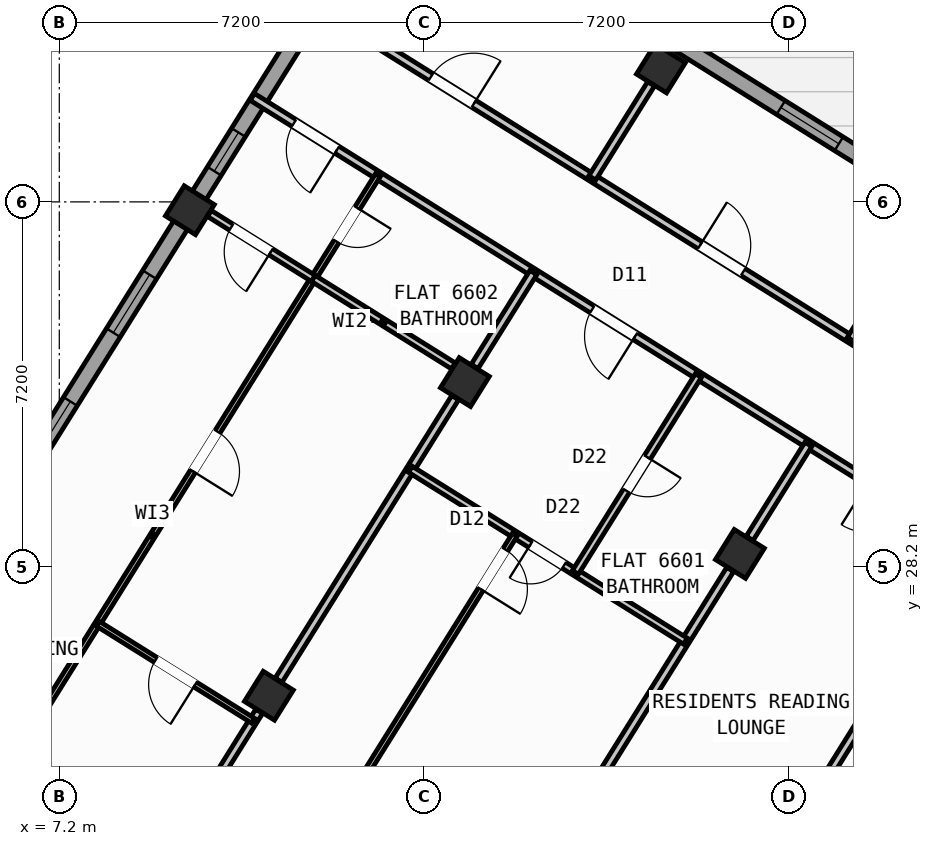
"""IFC4 building model, lengths in metres.
Left out: names, types, materials, properties, quantities, classifications, styles, units other than length and angle.
Written with IfcOpenShell. Run it as: python <this file> out.ifc"""

import sys

from ifc_helpers import new_model, si_unit, direction, frame, frame_2d, origin, origin_2d, place, context, subcontext, project, spatial, rectangle, hollow_rectangle, extrude, source, transform, mapped, element, fill, save


model = new_model("IFC4")
c1 = context("Model", 3, precision=1e-05, world=origin(), true_north=direction((0.0, 1.0)))
c2 = subcontext(c1, "Body", "Model", "MODEL_VIEW")
j1 = project(units=[si_unit("LENGTHUNIT", "METRE"), si_unit("PLANEANGLEUNIT", "RADIAN")], contexts=[c1])
p1 = place(None, origin())
s1 = spatial("IfcSite", under=j1, at=p1, CompositionType="ELEMENT")
p2 = place(p1, origin())
s2 = spatial("IfcBuilding", under=s1, at=p2, CompositionType="ELEMENT")
p3 = place(p2, frame((0.0, 0.0, 262.8)))
s3 = spatial("IfcBuildingStorey", under=s2, at=p3, CompositionType="ELEMENT", Elevation=262.8)
p4 = place(p3, frame((26.007, 24.976, 0.0), z_axis=(0.0, 0.0, 1.0), x_axis=(-0.529931155655, -0.848040665456, 0.0)))
e1 = element("IfcWall", 1, at=p4, inside=s3, PredefinedType="SHEAR", context=c2, shape_type="SweptSolid", body=[
    extrude(rectangle(XDim=6.475, YDim=0.45, at=frame_2d((3.238, 0.0))), origin(), (0.0, 0.0, 1.0), 3.35),
])
m1 = source(origin(), c2, "Body", "SweptSolid", [
    extrude(hollow_rectangle(XDim=0.7, YDim=0.7, WallThickness=0.028, at=origin_2d()), origin(), (0.0, 0.0, 1.0), 3.6),
])
for number, where, z_axis, x_axis in (
    (2, (20.632, 28.452, 0.0), (0.0, 0.0, 1.0), (-0.848, 0.53, 0.0)),
    (3, (19.073, 38.034, 0.0), (0.0, 0.0, 1.0), (-0.848, 0.53, 0.0)),
    (4, (15.205, 31.844, 0.0), (0.0, 0.0, 1.0), (-0.848, 0.53, 0.0)),
    (5, (11.336, 25.653, 0.0), (0.0, 0.0, 1.0), (-0.848, 0.53, 0.0)),
    (6, (9.777, 35.235, 0.0), (0.0, 0.0, 1.0), (-0.848, 0.53, 0.0)),
):
    element("IfcColumn", number, at=place(p3, frame(where, z_axis=z_axis, x_axis=x_axis)), inside=s3, PredefinedType="COLUMN", context=c2, shape_type="MappedRepresentation", body=[
        mapped(m1, transform((0.0, 0.0, 0.0), scale=1.0)),
    ])
p5 = place(p3, frame((2.415, 23.452, 0.0), z_axis=(0.0, 0.0, 1.0), x_axis=(0.52991049553, 0.848053575387, 0.0)))
e7 = element("IfcWall", 7, at=p5, inside=s3, PredefinedType="STANDARD", context=c2, shape_type="SweptSolid", body=[
    extrude(rectangle(XDim=21.587, YDim=0.32, at=frame_2d((10.794, 0.0))), origin(), (0.0, 0.0, 1.0), 2.875),
])
p6 = place(p5, frame((2.606, 0.0, 0.9)))
e8 = element("IfcOpeningElement", 8, at=p6, cuts=e7, PredefinedType="OPENING", context=c2, shape_type="SweptSolid", body=[
    extrude(rectangle(XDim=1.65, YDim=1.45, at=frame_2d((0.825, 0.725))), frame((0.0, 0.17, 0.0), z_axis=(0.0, -1.0, 0.0), x_axis=(1.0, 0.0, 0.0)), (0.0, 0.0, 1.0), 0.34),
])
p7 = place(p5, frame((8.094, 0.0, 0.9)))
e9 = element("IfcOpeningElement", 9, at=p7, cuts=e7, PredefinedType="OPENING", context=c2, shape_type="SweptSolid", body=[
    extrude(rectangle(XDim=1.35, YDim=1.45, at=frame_2d((0.675, 0.725))), frame((0.0, 0.17, 0.0), z_axis=(0.0, -1.0, 0.0), x_axis=(1.0, 0.0, 0.0)), (0.0, 0.0, 1.0), 0.34),
])
p8 = place(p5, frame((11.044, 0.0, 0.9)))
e10 = element("IfcOpeningElement", 10, at=p8, cuts=e7, PredefinedType="OPENING", context=c2, shape_type="SweptSolid", body=[
    extrude(rectangle(XDim=1.35, YDim=1.45, at=frame_2d((0.675, 0.725))), frame((0.0, 0.17, 0.0), z_axis=(0.0, -1.0, 0.0), x_axis=(1.0, 0.0, 0.0)), (0.0, 0.0, 1.0), 0.34),
])
p9 = place(p5, frame((14.804, 0.0, 1.0)))
e11 = element("IfcOpeningElement", 11, at=p9, cuts=e7, PredefinedType="OPENING", context=c2, shape_type="SweptSolid", body=[
    extrude(rectangle(XDim=0.9, YDim=1.25, at=frame_2d((0.45, 0.625))), frame((0.0, 0.17, 0.0), z_axis=(0.0, -1.0, 0.0), x_axis=(1.0, 0.0, 0.0)), (0.0, 0.0, 1.0), 0.34),
])
p10 = place(p5, frame((19.384, 0.0, 1.0)))
e12 = element("IfcOpeningElement", 12, at=p10, cuts=e7, PredefinedType="OPENING", context=c2, shape_type="SweptSolid", body=[
    extrude(rectangle(XDim=0.9, YDim=1.25, at=frame_2d((0.45, 0.625))), frame((0.0, 0.17, 0.0), z_axis=(0.0, -1.0, 0.0), x_axis=(1.0, 0.0, 0.0)), (0.0, 0.0, 1.0), 0.34),
])
p11 = place(p3, frame((14.138, 41.825, 0.0), z_axis=(0.0, 0.0, 1.0), x_axis=(0.848046498049, -0.529921821731, 0.0)))
e13 = element("IfcWall", 13, at=p11, inside=s3, PredefinedType="STANDARD", context=c2, shape_type="SweptSolid", body=[
    extrude(rectangle(XDim=31.588, YDim=0.32, at=frame_2d((15.794, 0.0))), origin(), (0.0, 0.0, 1.0), 3.35),
])
p12 = place(p11, frame((3.568, 0.0, 0.0)))
e14 = element("IfcOpeningElement", 14, at=p12, cuts=e13, PredefinedType="OPENING", context=c2, shape_type="SweptSolid", body=[
    extrude(rectangle(XDim=1.05, YDim=2.15, at=frame_2d((0.525, 1.075))), frame((0.0, 0.17, 0.0), z_axis=(0.0, -1.0, 0.0), x_axis=(1.0, 0.0, 0.0)), (0.0, 0.0, 1.0), 0.34),
])
p13 = place(p11, frame((1.046, 0.0, 0.9)))
e15 = element("IfcOpeningElement", 15, at=p13, cuts=e13, PredefinedType="OPENING", context=c2, shape_type="SweptSolid", body=[
    extrude(rectangle(XDim=1.65, YDim=1.45, at=frame_2d((0.825, 0.725))), frame((0.0, 0.17, 0.0), z_axis=(0.0, -1.0, 0.0), x_axis=(1.0, 0.0, 0.0)), (0.0, 0.0, 1.0), 0.34),
])
p14 = place(p11, frame((8.61, 0.0, 0.9)))
e16 = element("IfcOpeningElement", 16, at=p14, cuts=e13, PredefinedType="OPENING", context=c2, shape_type="SweptSolid", body=[
    extrude(rectangle(XDim=1.35, YDim=1.45, at=frame_2d((0.675, 0.725))), frame((0.0, 0.17, 0.0), z_axis=(0.0, -1.0, 0.0), x_axis=(1.0, 0.0, 0.0)), (0.0, 0.0, 1.0), 0.34),
])
p15 = place(p11, frame((13.599, 0.0, 0.95)))
e17 = element("IfcOpeningElement", 17, at=p15, cuts=e13, PredefinedType="OPENING", context=c2, shape_type="SweptSolid", body=[
    extrude(rectangle(XDim=1.95, YDim=1.35, at=frame_2d((0.975, 0.675))), frame((0.0, 0.17, 0.0), z_axis=(0.0, -1.0, 0.0), x_axis=(1.0, 0.0, 0.0)), (0.0, 0.0, 1.0), 0.34),
])
p16 = place(p11, frame((17.154, 0.0, 1.0)))
e18 = element("IfcOpeningElement", 18, at=p16, cuts=e13, PredefinedType="OPENING", context=c2, shape_type="SweptSolid", body=[
    extrude(rectangle(XDim=0.9, YDim=1.25, at=frame_2d((0.45, 0.625))), frame((0.0, 0.17, 0.0), z_axis=(0.0, -1.0, 0.0), x_axis=(1.0, 0.0, 0.0)), (0.0, 0.0, 1.0), 0.34),
])
p17 = place(p11, frame((21.719, 0.0, 0.9)))
e19 = element("IfcOpeningElement", 19, at=p17, cuts=e13, PredefinedType="OPENING", context=c2, shape_type="SweptSolid", body=[
    extrude(rectangle(XDim=1.65, YDim=1.45, at=frame_2d((0.825, 0.725))), frame((0.0, 0.17, 0.0), z_axis=(0.0, -1.0, 0.0), x_axis=(1.0, 0.0, 0.0)), (0.0, 0.0, 1.0), 0.34),
])
p18 = place(p11, frame((27.419, 0.0, 0.9)))
e20 = element("IfcOpeningElement", 20, at=p18, cuts=e13, PredefinedType="OPENING", context=c2, shape_type="SweptSolid", body=[
    extrude(rectangle(XDim=1.65, YDim=1.45, at=frame_2d((0.825, 0.725))), frame((0.0, 0.17, 0.0), z_axis=(0.0, -1.0, 0.0), x_axis=(1.0, 0.0, 0.0)), (0.0, 0.0, 1.0), 0.34),
])
p19 = place(p3, frame((25.198, 28.606, 0.0), z_axis=(0.0, 0.0, 1.0), x_axis=(-0.529921796515, -0.848046513806, 0.0)))
e21 = element("IfcWall", 21, at=p19, inside=s3, PredefinedType="PARTITIONING", context=c2, shape_type="SweptSolid", body=[
    extrude(rectangle(XDim=16.5, YDim=0.16, at=frame_2d((8.25, 0.0))), origin(), (0.0, 0.0, 1.0), 3.34),
])
p20 = place(p3, frame((26.363, 30.472, 0.0), z_axis=(0.0, 0.0, 1.0), x_axis=(-0.848052408131, 0.529912363569, 0.0)))
e22 = element("IfcWall", 22, at=p20, inside=s3, PredefinedType="PARTITIONING", context=c2, shape_type="SweptSolid", body=[
    extrude(rectangle(XDim=16.73, YDim=0.16, at=frame_2d((8.365, 0.0))), origin(), (0.0, 0.0, 1.0), 3.34),
])
p21 = place(p20, frame((1.588, 0.0, 0.0)))
e23 = element("IfcOpeningElement", 23, at=p21, cuts=e22, PredefinedType="OPENING", context=c2, shape_type="SweptSolid", body=[
    extrude(rectangle(XDim=1.0, YDim=2.1, at=frame_2d((0.5, 1.05))), frame((0.0, 0.09, 0.0), z_axis=(0.0, -1.0, 0.0), x_axis=(1.0, 0.0, 0.0)), (0.0, 0.0, 1.0), 0.18),
])
p22 = place(p20, frame((6.685, 0.0, 0.0)))
e24 = element("IfcOpeningElement", 24, at=p22, cuts=e22, PredefinedType="OPENING", context=c2, shape_type="SweptSolid", body=[
    extrude(rectangle(XDim=1.0, YDim=2.1, at=frame_2d((0.5, 1.05))), frame((0.0, 0.09, 0.0), z_axis=(0.0, -1.0, 0.0), x_axis=(1.0, 0.0, 0.0)), (0.0, 0.0, 1.0), 0.18),
])
p23 = place(p20, frame((12.951, 0.0, 0.0)))
e25 = element("IfcOpeningElement", 25, at=p23, cuts=e22, PredefinedType="OPENING", context=c2, shape_type="SweptSolid", body=[
    extrude(rectangle(XDim=1.0, YDim=2.1, at=frame_2d((0.5, 1.05))), frame((0.0, 0.09, 0.0), z_axis=(0.0, -1.0, 0.0), x_axis=(1.0, 0.0, 0.0)), (0.0, 0.0, 1.0), 0.18),
])
p24 = place(p3, frame((25.198, 28.606, 0.0), z_axis=(0.0, 0.0, 1.0), x_axis=(-0.848052408131, 0.529912363569, 0.0)))
e26 = element("IfcWall", 26, at=p24, inside=s3, PredefinedType="PARTITIONING", context=c2, shape_type="SweptSolid", body=[
    extrude(rectangle(XDim=16.73, YDim=0.16, at=frame_2d((8.365, 0.0))), origin(), (0.0, 0.0, 1.0), 3.34),
])
p25 = place(p24, frame((1.395, 0.0, 0.0)))
e27 = element("IfcOpeningElement", 27, at=p25, cuts=e26, PredefinedType="OPENING", context=c2, shape_type="SweptSolid", body=[
    extrude(rectangle(XDim=1.0, YDim=2.1, at=frame_2d((0.5, 1.05))), frame((0.0, 0.09, 0.0), z_axis=(0.0, -1.0, 0.0), x_axis=(1.0, 0.0, 0.0)), (0.0, 0.0, 1.0), 0.18),
])
p26 = place(p24, frame((7.82, 0.0, 0.0)))
e28 = element("IfcOpeningElement", 28, at=p26, cuts=e26, PredefinedType="OPENING", context=c2, shape_type="SweptSolid", body=[
    extrude(rectangle(XDim=1.0, YDim=2.1, at=frame_2d((0.5, 1.05))), frame((0.0, 0.09, 0.0), z_axis=(0.0, -1.0, 0.0), x_axis=(1.0, 0.0, 0.0)), (0.0, 0.0, 1.0), 0.18),
])
p27 = place(p24, frame((14.76, 0.0, 0.0)))
e29 = element("IfcOpeningElement", 29, at=p27, cuts=e26, PredefinedType="OPENING", context=c2, shape_type="SweptSolid", body=[
    extrude(rectangle(XDim=1.0, YDim=2.1, at=frame_2d((0.5, 1.05))), frame((0.0, 0.09, 0.0), z_axis=(0.0, -1.0, 0.0), x_axis=(1.0, 0.0, 0.0)), (0.0, 0.0, 1.0), 0.18),
])
p28 = place(p3, frame((21.983, 30.615, 0.0), z_axis=(0.0, 0.0, 1.0), x_axis=(-0.5299186965, -0.848048450915, 0.0)))
e30 = element("IfcWall", 30, at=p28, inside=s3, PredefinedType="PARTITIONING", context=c2, shape_type="SweptSolid", body=[
    extrude(rectangle(XDim=2.188, YDim=0.16, at=frame_2d((1.094, 0.0))), origin(), (0.0, 0.0, 1.0), 2.875),
])
p29 = place(p3, frame((20.44, 28.145, 0.0), z_axis=(0.0, 0.0, 1.0), x_axis=(-0.529938869374, -0.84803584519, 0.0)))
e31 = element("IfcWall", 31, at=p29, inside=s3, PredefinedType="PARTITIONING", context=c2, shape_type="SweptSolid", body=[
    extrude(rectangle(XDim=6.576, YDim=0.16, at=frame_2d((3.288, 0.0))), origin(), (0.0, 0.0, 1.0), 2.875),
])
p30 = place(p3, frame((16.556, 34.006, 0.0), z_axis=(0.0, 0.0, 1.0), x_axis=(-0.529998940003, -0.847998304005, 0.0)))
e32 = element("IfcWall", 32, at=p30, inside=s3, PredefinedType="PARTITIONING", context=c2, shape_type="SweptSolid", body=[
    extrude(rectangle(XDim=2.188, YDim=0.16, at=frame_2d((1.094, 0.0))), origin(), (0.0, 0.0, 1.0), 2.875),
])
p31 = place(p3, frame((15.013, 31.537, 0.0), z_axis=(0.0, 0.0, 1.0), x_axis=(-0.529922185033, -0.848046271031, 0.0)))
e33 = element("IfcWall", 33, at=p31, inside=s3, PredefinedType="PARTITIONING", context=c2, shape_type="SweptSolid", body=[
    extrude(rectangle(XDim=6.576, YDim=0.16, at=frame_2d((3.288, 0.0))), origin(), (0.0, 0.0, 1.0), 2.875),
])
p32 = place(p3, frame((11.144, 25.346, 0.0), z_axis=(0.0, 0.0, 1.0), x_axis=(-0.529904903214, -0.848057069748, 0.0)))
e34 = element("IfcWall", 34, at=p32, inside=s3, PredefinedType="PARTITIONING", context=c2, shape_type="SweptSolid", body=[
    extrude(rectangle(XDim=5.601, YDim=0.16, at=frame_2d((2.801, 0.0))), origin(), (0.0, 0.0, 1.0), 2.875),
])
p33 = place(p3, frame((19.556, 26.73, 0.0), z_axis=(0.0, 0.0, 1.0), x_axis=(-0.848049732085, 0.529916646191, 0.0)))
e35 = element("IfcWall", 35, at=p33, inside=s3, PredefinedType="PLUMBINGWALL", context=c2, shape_type="SweptSolid", body=[
    extrude(rectangle(XDim=6.4, YDim=0.14, at=frame_2d((3.2, 0.0))), origin(), (0.0, 0.0, 1.0), 3.34),
])
p34 = place(p33, frame((2.824, 0.0, 0.0)))
e36 = element("IfcOpeningElement", 36, at=p34, cuts=e35, PredefinedType="OPENING", context=c2, shape_type="SweptSolid", body=[
    extrude(rectangle(XDim=0.78, YDim=2.05, at=frame_2d((0.39, 1.025))), frame((0.0, 0.08, 0.0), z_axis=(0.0, -1.0, 0.0), x_axis=(1.0, 0.0, 0.0)), (0.0, 0.0, 1.0), 0.16),
])
p35 = place(p3, frame((19.812, 31.971, 0.0), z_axis=(0.0, 0.0, 1.0), x_axis=(-0.529917480809, -0.848049210561, 0.0)))
e37 = element("IfcWall", 37, at=p35, inside=s3, PredefinedType="PLUMBINGWALL", context=c2, shape_type="SweptSolid", body=[
    extrude(rectangle(XDim=4.58, YDim=0.14, at=frame_2d((2.29, 0.0))), origin(), (0.0, 0.0, 1.0), 3.34),
])
p36 = place(p35, frame((1.9, 0.0, 0.0)))
e38 = element("IfcOpeningElement", 38, at=p36, cuts=e37, PredefinedType="OPENING", context=c2, shape_type="SweptSolid", body=[
    extrude(rectangle(XDim=0.78, YDim=2.05, at=frame_2d((0.39, 1.025))), frame((0.0, 0.08, 0.0), z_axis=(0.0, -1.0, 0.0), x_axis=(1.0, 0.0, 0.0)), (0.0, 0.0, 1.0), 0.16),
])
p37 = place(p3, frame((16.191, 28.833, 0.0), z_axis=(0.0, 0.0, 1.0), x_axis=(-0.529921526101, -0.84804668278, 0.0)))
e39 = element("IfcWall", 39, at=p37, inside=s3, PredefinedType="PARTITIONING", context=c2, shape_type="SweptSolid", body=[
    extrude(rectangle(XDim=12.19, YDim=0.11, at=frame_2d((6.095, 0.0))), origin(), (0.0, 0.0, 1.0), 3.34),
])
p38 = place(p37, frame((0.35, 0.0, 0.0)))
e40 = element("IfcOpeningElement", 40, at=p38, cuts=e39, PredefinedType="OPENING", context=c2, shape_type="SweptSolid", body=[
    extrude(rectangle(XDim=0.92, YDim=2.08, at=frame_2d((0.46, 1.04))), frame((0.0, 0.065, 0.0), z_axis=(0.0, -1.0, 0.0), x_axis=(1.0, 0.0, 0.0)), (0.0, 0.0, 1.0), 0.13),
])
p39 = place(p3, frame((13.486, 35.924, 0.0), z_axis=(0.0, 0.0, 1.0), x_axis=(-0.529920421309, -0.848047373134, 0.0)))
e41 = element("IfcWall", 41, at=p39, inside=s3, PredefinedType="PARTITIONING", context=c2, shape_type="SweptSolid", body=[
    extrude(rectangle(XDim=16.77, YDim=0.11, at=frame_2d((8.385, 0.0))), origin(), (0.0, 0.0, 1.0), 3.34),
])
p40 = place(p39, frame((0.76, 0.0, 0.0)))
e42 = element("IfcOpeningElement", 42, at=p40, cuts=e41, PredefinedType="OPENING", context=c2, shape_type="SweptSolid", body=[
    extrude(rectangle(XDim=0.78, YDim=2.05, at=frame_2d((0.39, 1.025))), frame((0.0, 0.065, 0.0), z_axis=(0.0, -1.0, 0.0), x_axis=(1.0, 0.0, 0.0)), (0.0, 0.0, 1.0), 0.13),
])
p41 = place(p39, frame((5.967, 0.0, 0.0)))
e43 = element("IfcOpeningElement", 43, at=p41, cuts=e41, PredefinedType="OPENING", context=c2, shape_type="SweptSolid", body=[
    extrude(rectangle(XDim=0.92, YDim=2.08, at=frame_2d((0.46, 1.04))), frame((0.0, 0.065, 0.0), z_axis=(0.0, -1.0, 0.0), x_axis=(1.0, 0.0, 0.0)), (0.0, 0.0, 1.0), 0.13),
])
p42 = place(p3, frame((12.214, 33.889, 0.0), z_axis=(0.0, 0.0, 1.0), x_axis=(-0.848060696325, 0.529899099216, 0.0)))
e44 = element("IfcWall", 44, at=p42, inside=s3, PredefinedType="PLUMBINGWALL", context=c2, shape_type="SweptSolid", body=[
    extrude(rectangle(XDim=2.418, YDim=0.14, at=frame_2d((1.209, 0.0))), origin(), (0.0, 0.0, 1.0), 2.875),
])
p43 = place(p42, frame((0.99, 0.0, 0.0)))
e45 = element("IfcOpeningElement", 45, at=p43, cuts=e44, PredefinedType="OPENING", context=c2, shape_type="SweptSolid", body=[
    extrude(rectangle(XDim=0.92, YDim=2.08, at=frame_2d((0.46, 1.04))), frame((0.0, 0.08, 0.0), z_axis=(0.0, -1.0, 0.0), x_axis=(1.0, 0.0, 0.0)), (0.0, 0.0, 1.0), 0.16),
])
p44 = place(p3, frame((14.977, 32.163, 0.0), z_axis=(0.0, 0.0, 1.0), x_axis=(-0.848036190178, 0.529938317305, 0.0)))
e46 = element("IfcWall", 46, at=p44, inside=s3, PredefinedType="PLUMBINGWALL", context=c2, shape_type="SweptSolid", body=[
    extrude(rectangle(XDim=3.258, YDim=0.14, at=frame_2d((1.629, 0.0))), origin(), (0.0, 0.0, 1.0), 2.875),
])
p45 = place(p3, frame((11.027, 25.158, 0.0), z_axis=(0.0, 0.0, 1.0), x_axis=(-0.848051346257, 0.52991406295, 0.0)))
e47 = element("IfcWall", 47, at=p45, inside=s3, PredefinedType="PARTITIONING", context=c2, shape_type="SweptSolid", body=[
    extrude(rectangle(XDim=3.62, YDim=0.11, at=frame_2d((1.81, 0.0))), origin(), (0.0, 0.0, 1.0), 3.34),
])
p46 = place(p45, frame((1.35, 0.0, 0.0)))
e48 = element("IfcOpeningElement", 48, at=p46, cuts=e47, PredefinedType="OPENING", context=c2, shape_type="SweptSolid", body=[
    extrude(rectangle(XDim=0.92, YDim=2.08, at=frame_2d((0.46, 1.04))), frame((0.0, 0.065, 0.0), z_axis=(0.0, -1.0, 0.0), x_axis=(1.0, 0.0, 0.0)), (0.0, 0.0, 1.0), 0.13),
])
p47 = place(p3, frame((24.411, 35.229, 0.0), z_axis=(0.0, 0.0, 1.0), x_axis=(-0.529874576144, -0.848076018737, 0.0)))
e49 = element("IfcWall", 49, at=p47, inside=s3, PredefinedType="PARTITIONING", context=c2, shape_type="SweptSolid", body=[
    extrude(rectangle(XDim=3.0, YDim=0.16, at=frame_2d((1.5, 0.0))), origin(), (0.0, 0.0, 1.0), 3.34),
])
p48 = place(p3, frame((18.879, 37.729, 0.0), z_axis=(0.0, 0.0, 1.0), x_axis=(-0.52994879608, -0.848029641896, 0.0)))
e50 = element("IfcWall", 50, at=p48, inside=s3, PredefinedType="PARTITIONING", context=c2, shape_type="SweptSolid", body=[
    extrude(rectangle(XDim=2.188, YDim=0.16, at=frame_2d((1.094, 0.0))), origin(), (0.0, 0.0, 1.0), 2.875),
])
m2 = source(origin(), c2, "Body", "SweptSolid", [
    extrude(rectangle(XDim=1.35, YDim=1.45, at=frame_2d((0.675, 0.725))), frame((0.0, 0.03, 0.0), z_axis=(0.0, -1.0, 0.0), x_axis=(1.0, 0.0, 0.0)), (0.0, 0.0, 1.0), 0.06),
])
p49 = place(p7, origin())
e51 = element("IfcWindow", 51, at=p49, inside=s3, PartitioningType="SINGLE_PANEL", PredefinedType="WINDOW", context=c2, shape_type="MappedRepresentation", body=[
    mapped(m2, transform((0.0, 0.0, 0.0), scale=1.0)),
])
fill(e9, e51)
p50 = place(p8, origin())
e52 = element("IfcWindow", 52, at=p50, inside=s3, PartitioningType="SINGLE_PANEL", PredefinedType="WINDOW", context=c2, shape_type="MappedRepresentation", body=[
    mapped(m2, transform((0.0, 0.0, 0.0), scale=1.0)),
])
fill(e10, e52)
m3 = source(origin(), c2, "Body", "SweptSolid", [
    extrude(rectangle(XDim=0.9, YDim=1.25, at=frame_2d((0.45, 0.625))), frame((0.0, 0.03, 0.0), z_axis=(0.0, -1.0, 0.0), x_axis=(1.0, 0.0, 0.0)), (0.0, 0.0, 1.0), 0.06),
])
p51 = place(p9, origin())
e53 = element("IfcWindow", 53, at=p51, inside=s3, PartitioningType="SINGLE_PANEL", PredefinedType="WINDOW", context=c2, shape_type="MappedRepresentation", body=[
    mapped(m3, transform((0.0, 0.0, 0.0), scale=1.0)),
])
fill(e11, e53)
p52 = place(p14, origin())
e54 = element("IfcWindow", 54, at=p52, inside=s3, PartitioningType="SINGLE_PANEL", PredefinedType="WINDOW", context=c2, shape_type="MappedRepresentation", body=[
    mapped(m2, transform((0.0, 0.0, 0.0), scale=1.0)),
])
fill(e16, e54)
m4 = source(origin(), c2, "Body", "SweptSolid", [
    extrude(rectangle(XDim=0.92, YDim=2.08, at=frame_2d((0.46, 1.04))), frame((0.0, 0.025, 0.0), z_axis=(0.0, -1.0, 0.0), x_axis=(1.0, 0.0, 0.0)), (0.0, 0.0, 1.0), 0.05),
])
p53 = place(p38, origin())
e55 = element("IfcDoor", 55, at=p53, inside=s3, OperationType="SINGLE_SWING_RIGHT", PredefinedType="DOOR", context=c2, shape_type="MappedRepresentation", body=[
    mapped(m4, transform((0.0, 0.0, 0.0), scale=1.0)),
])
fill(e40, e55)
m5 = source(origin(), c2, "Body", "SweptSolid", [
    extrude(rectangle(XDim=1.0, YDim=2.1, at=frame_2d((0.5, 1.05))), frame((0.0, 0.025, 0.0), z_axis=(0.0, -1.0, 0.0), x_axis=(1.0, 0.0, 0.0)), (0.0, 0.0, 1.0), 0.05),
])
p54 = place(p26, origin())
e56 = element("IfcDoor", 56, at=p54, inside=s3, OperationType="SINGLE_SWING_LEFT", PredefinedType="DOOR", context=c2, shape_type="MappedRepresentation", body=[
    mapped(m5, transform((0.0, 0.0, 0.0), scale=1.0)),
])
fill(e28, e56)
m6 = source(origin(), c2, "Body", "SweptSolid", [
    extrude(rectangle(XDim=0.78, YDim=2.05, at=frame_2d((0.39, 1.025))), frame((0.0, 0.025, 0.0), z_axis=(0.0, -1.0, 0.0), x_axis=(1.0, 0.0, 0.0)), (0.0, 0.0, 1.0), 0.05),
])
p55 = place(p34, origin())
e57 = element("IfcDoor", 57, at=p55, inside=s3, OperationType="SINGLE_SWING_RIGHT", PredefinedType="DOOR", context=c2, shape_type="MappedRepresentation", body=[
    mapped(m6, transform((0.0, 0.0, 0.0), scale=1.0)),
])
fill(e36, e57)
p56 = place(p36, origin())
e58 = element("IfcDoor", 58, at=p56, inside=s3, OperationType="SINGLE_SWING_LEFT", PredefinedType="DOOR", context=c2, shape_type="MappedRepresentation", body=[
    mapped(m6, transform((0.0, 0.0, 0.0), scale=1.0)),
])
fill(e38, e58)
p57 = place(p27, origin())
e59 = element("IfcDoor", 59, at=p57, inside=s3, OperationType="SINGLE_SWING_LEFT", PredefinedType="DOOR", context=c2, shape_type="MappedRepresentation", body=[
    mapped(m5, transform((0.0, 0.0, 0.0), scale=1.0)),
])
fill(e29, e59)
p58 = place(p43, origin())
e60 = element("IfcDoor", 60, at=p58, inside=s3, OperationType="SINGLE_SWING_LEFT", PredefinedType="DOOR", context=c2, shape_type="MappedRepresentation", body=[
    mapped(m4, transform((0.0, 0.0, 0.0), scale=1.0)),
])
fill(e45, e60)
p59 = place(p40, origin())
e61 = element("IfcDoor", 61, at=p59, inside=s3, OperationType="SINGLE_SWING_LEFT", PredefinedType="DOOR", context=c2, shape_type="MappedRepresentation", body=[
    mapped(m6, transform((0.0, 0.0, 0.0), scale=1.0)),
])
fill(e42, e61)
p60 = place(p41, origin())
e62 = element("IfcDoor", 62, at=p60, inside=s3, OperationType="SINGLE_SWING_RIGHT", PredefinedType="DOOR", context=c2, shape_type="MappedRepresentation", body=[
    mapped(m4, transform((0.0, 0.0, 0.0), scale=1.0)),
])
fill(e43, e62)
p61 = place(p46, origin())
e63 = element("IfcDoor", 63, at=p61, inside=s3, OperationType="SINGLE_SWING_LEFT", PredefinedType="DOOR", context=c2, shape_type="MappedRepresentation", body=[
    mapped(m4, transform((0.0, 0.0, 0.0), scale=1.0)),
])
fill(e48, e63)
p62 = place(p22, frame((1.0, 0.0, 0.0), z_axis=(0.0, 0.0, 1.0), x_axis=(-1.0, 0.0, 0.0)))
e64 = element("IfcDoor", 64, at=p62, inside=s3, OperationType="SINGLE_SWING_LEFT", PredefinedType="DOOR", context=c2, shape_type="MappedRepresentation", body=[
    mapped(m5, transform((0.0, 0.0, 0.0), scale=1.0)),
])
fill(e24, e64)
p63 = place(p23, frame((1.0, 0.0, 0.0), z_axis=(0.0, 0.0, 1.0), x_axis=(-1.0, 0.0, 0.0)))
e65 = element("IfcDoor", 65, at=p63, inside=s3, OperationType="SINGLE_SWING_RIGHT", PredefinedType="DOOR", context=c2, shape_type="MappedRepresentation", body=[
    mapped(m5, transform((0.0, 0.0, 0.0), scale=1.0)),
])
fill(e25, e65)
save(model, sys.argv[1])
